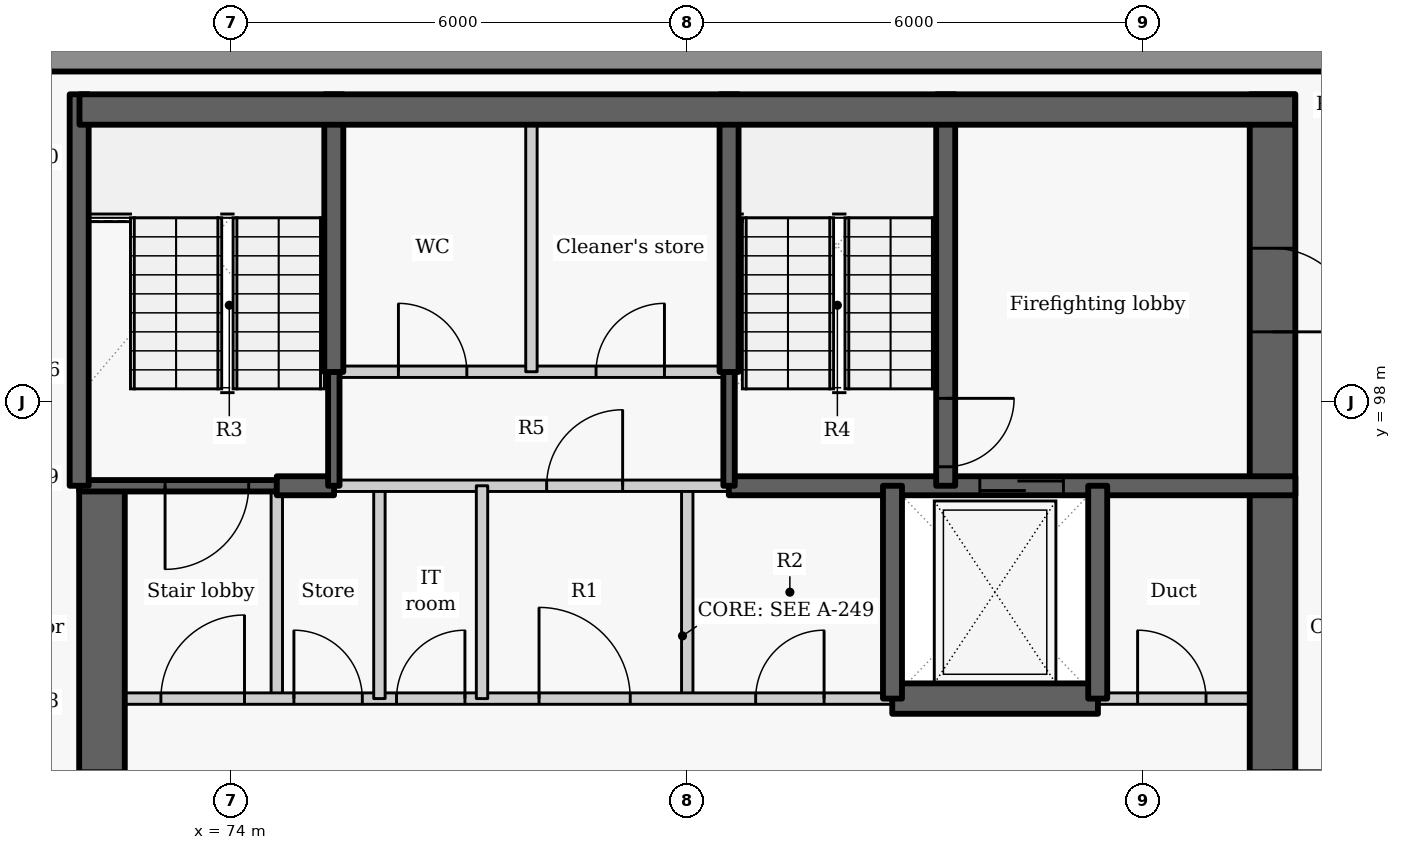
"""IFC4 building model, lengths in metres.
Left out: names, types, materials, properties, quantities, classifications, styles, units other than length and angle.
Written with IfcOpenShell. Run it as: python <this file> out.ifc"""

import sys

from ifc_helpers import new_model, si_unit, direction, frame, frame_2d, origin, place, context, subcontext, project, spatial, rectangle, extrude, element, fill, save


model = new_model("IFC4")
c1 = context("Model", 3, precision=1e-05, world=origin(), true_north=direction((0.0, 1.0)))
c2 = subcontext(c1, "Body", "Model", "MODEL_VIEW")
j1 = project(units=[si_unit("LENGTHUNIT", "METRE"), si_unit("PLANEANGLEUNIT", "RADIAN")], contexts=[c1])
p1 = place(None, origin())
s1 = spatial("IfcSite", under=j1, at=p1, CompositionType="ELEMENT")
p2 = place(p1, origin())
s2 = spatial("IfcBuilding", under=s1, at=p2, CompositionType="ELEMENT")
p3 = place(p2, frame((0.0, 0.0, 286.8)))
s3 = spatial("IfcBuildingStorey", under=s2, at=p3, CompositionType="ELEMENT", Elevation=286.8)
p4 = place(p3, frame((89.549, 102.5, 0.0), z_axis=(0.0, 0.0, 1.0), x_axis=(-1.0, 0.0, 0.0)))
e1 = element("IfcWall", 1, at=p4, inside=s3, PredefinedType="SOLIDWALL", context=c2, shape_type="SweptSolid", body=[
    extrude(rectangle(XDim=19.134, YDim=0.3, at=frame_2d((9.567, 0.0))), origin(), (0.0, 0.0, 1.0), 2.725),
])
p5 = place(p3, frame((74.6, 94.1, 0.0), z_axis=(0.0, 0.0, 1.0), x_axis=(0.0, 1.0, 0.0)))
e2 = element("IfcWall", 2, at=p5, inside=s3, PredefinedType="PARTITIONING", context=c2, shape_type="SweptSolid", body=[
    extrude(rectangle(XDim=2.8, YDim=0.15, at=frame_2d((1.4, 0.0))), origin(), (0.0, 0.0, 1.0), 3.325),
])
p6 = place(p3, frame((72.3, 87.8, -0.275), z_axis=(0.0, 0.0, 1.0), x_axis=(0.0, 1.0, 0.0)))
e3 = element("IfcWall", 3, at=p6, inside=s3, PredefinedType="SHEAR", context=c2, shape_type="SweptSolid", body=[
    extrude(rectangle(XDim=9.1, YDim=0.6, at=frame_2d((4.55, 0.0))), origin(), (0.0, 0.0, 1.0), 3.6),
])
p7 = place(p6, frame((3.85, 0.0, 0.275)))
e4 = element("IfcOpeningElement", 4, at=p7, cuts=e3, PredefinedType="OPENING", context=c2, shape_type="SweptSolid", body=[
    extrude(rectangle(XDim=1.5, YDim=2.1, at=frame_2d((0.75, 1.05))), frame((0.0, 0.31, 0.0), z_axis=(0.0, -1.0, 0.0), x_axis=(1.0, 0.0, 0.0)), (0.0, 0.0, 1.0), 0.62),
])
p8 = place(p3, frame((80.0, 94.1, 0.0), z_axis=(0.0, 0.0, 1.0), x_axis=(0.0, 1.0, 0.0)))
e5 = element("IfcWall", 5, at=p8, inside=s3, PredefinedType="PARTITIONING", context=c2, shape_type="SweptSolid", body=[
    extrude(rectangle(XDim=2.8, YDim=0.15, at=frame_2d((1.4, 0.0))), origin(), (0.0, 0.0, 1.0), 3.325),
])
p9 = place(p3, frame((72.0, 94.1, 0.0), z_axis=(0.0, 0.0, 1.0), x_axis=(1.0, 0.0, 0.0)))
e6 = element("IfcWall", 6, at=p9, inside=s3, PredefinedType="PARTITIONING", context=c2, shape_type="SweptSolid", body=[
    extrude(rectangle(XDim=10.703, YDim=0.15, at=frame_2d((5.352, 0.0))), origin(), (0.0, 0.0, 1.0), 3.325),
])
p10 = place(p9, frame((1.075, 0.0, 0.0)))
e7 = element("IfcOpeningElement", 7, at=p10, cuts=e6, PredefinedType="OPENING", context=c2, shape_type="SweptSolid", body=[
    extrude(rectangle(XDim=1.1, YDim=2.1, at=frame_2d((0.55, 1.05))), frame((0.0, 0.085, 0.0), z_axis=(0.0, -1.0, 0.0), x_axis=(1.0, 0.0, 0.0)), (0.0, 0.0, 1.0), 0.17),
])
p11 = place(p9, frame((2.825, 0.0, 0.0)))
e8 = element("IfcOpeningElement", 8, at=p11, cuts=e6, PredefinedType="OPENING", context=c2, shape_type="SweptSolid", body=[
    extrude(rectangle(XDim=0.9, YDim=2.1, at=frame_2d((0.45, 1.05))), frame((0.0, 0.085, 0.0), z_axis=(0.0, -1.0, 0.0), x_axis=(1.0, 0.0, 0.0)), (0.0, 0.0, 1.0), 0.17),
])
p12 = place(p9, frame((4.175, 0.0, 0.0)))
e9 = element("IfcOpeningElement", 9, at=p12, cuts=e6, PredefinedType="OPENING", context=c2, shape_type="SweptSolid", body=[
    extrude(rectangle(XDim=0.9, YDim=2.1, at=frame_2d((0.45, 1.05))), frame((0.0, 0.085, 0.0), z_axis=(0.0, -1.0, 0.0), x_axis=(1.0, 0.0, 0.0)), (0.0, 0.0, 1.0), 0.17),
])
p13 = place(p9, frame((6.05, 0.0, 0.0)))
e10 = element("IfcOpeningElement", 10, at=p13, cuts=e6, PredefinedType="OPENING", context=c2, shape_type="SweptSolid", body=[
    extrude(rectangle(XDim=1.2, YDim=2.1, at=frame_2d((0.6, 1.05))), frame((0.0, 0.085, 0.0), z_axis=(0.0, -1.0, 0.0), x_axis=(1.0, 0.0, 0.0)), (0.0, 0.0, 1.0), 0.17),
])
p14 = place(p9, frame((8.9, 0.0, 0.0)))
e11 = element("IfcOpeningElement", 11, at=p14, cuts=e6, PredefinedType="OPENING", context=c2, shape_type="SweptSolid", body=[
    extrude(rectangle(XDim=0.9, YDim=2.1, at=frame_2d((0.45, 1.05))), frame((0.0, 0.085, 0.0), z_axis=(0.0, -1.0, 0.0), x_axis=(1.0, 0.0, 0.0)), (0.0, 0.0, 1.0), 0.17),
])
p15 = place(p3, frame((85.397, 94.1, 0.0), z_axis=(0.0, 0.0, 1.0), x_axis=(1.0, 0.0, 0.0)))
e12 = element("IfcWall", 12, at=p15, inside=s3, PredefinedType="PARTITIONING", context=c2, shape_type="SweptSolid", body=[
    extrude(rectangle(XDim=2.603, YDim=0.15, at=frame_2d((1.302, 0.0))), origin(), (0.0, 0.0, 1.0), 3.325),
])
p16 = place(p15, frame((0.528, 0.0, 0.0)))
e13 = element("IfcOpeningElement", 13, at=p16, cuts=e12, PredefinedType="OPENING", context=c2, shape_type="SweptSolid", body=[
    extrude(rectangle(XDim=0.9, YDim=2.1, at=frame_2d((0.45, 1.05))), frame((0.0, 0.085, 0.0), z_axis=(0.0, -1.0, 0.0), x_axis=(1.0, 0.0, 0.0)), (0.0, 0.0, 1.0), 0.17),
])
p17 = place(p3, frame((82.697, 94.1, -0.275), z_axis=(0.0, 0.0, 1.0), x_axis=(1.0, 0.0, 0.0)))
e14 = element("IfcWall", 14, at=p17, inside=s3, PredefinedType="SHEAR", context=c2, shape_type="SweptSolid", body=[
    extrude(rectangle(XDim=2.706, YDim=0.4, at=frame_2d((1.353, 0.0))), origin(), (0.0, 0.0, 1.0), 3.6),
])
p18 = place(p3, frame((87.7, 102.05, -0.275), z_axis=(0.0, 0.0, 1.0), x_axis=(0.0, -1.0, 0.0)))
e15 = element("IfcWall", 15, at=p18, inside=s3, PredefinedType="SHEAR", context=c2, shape_type="SweptSolid", body=[
    extrude(rectangle(XDim=11.35, YDim=0.6, at=frame_2d((5.675, 0.0))), origin(), (0.0, 0.0, 1.0), 3.6),
])
p19 = place(p18, frame((8.9, 0.0, 0.275)))
e16 = element("IfcOpeningElement", 16, at=p19, cuts=e15, PredefinedType="OPENING", context=c2, shape_type="SweptSolid", body=[
    extrude(rectangle(XDim=1.5, YDim=2.1, at=frame_2d((0.75, 1.05))), frame((0.0, 0.31, 0.0), z_axis=(0.0, -1.0, 0.0), x_axis=(1.0, 0.0, 0.0)), (0.0, 0.0, 1.0), 0.62),
])
p20 = place(p18, frame((2.025, 0.0, 0.275)))
e17 = element("IfcOpeningElement", 17, at=p20, cuts=e15, PredefinedType="OPENING", context=c2, shape_type="SweptSolid", body=[
    extrude(rectangle(XDim=1.1, YDim=2.1, at=frame_2d((0.55, 1.05))), frame((0.0, 0.31, 0.0), z_axis=(0.0, -1.0, 0.0), x_axis=(1.0, 0.0, 0.0)), (0.0, 0.0, 1.0), 0.62),
])
p21 = place(p3, frame((74.6, 96.9, -0.275), z_axis=(0.0, 0.0, 1.0), x_axis=(-1.0, 0.0, 0.0)))
e18 = element("IfcWall", 18, at=p21, inside=s3, PredefinedType="SHEAR", context=c2, shape_type="SweptSolid", body=[
    extrude(rectangle(XDim=2.6, YDim=0.15, at=frame_2d((1.3, 0.0))), origin(), (0.0, 0.0, 1.0), 3.6),
])
p22 = place(p21, frame((0.37, 0.0, 0.275)))
e19 = element("IfcOpeningElement", 19, at=p22, cuts=e18, PredefinedType="OPENING", context=c2, shape_type="SweptSolid", body=[
    extrude(rectangle(XDim=1.1, YDim=2.1, at=frame_2d((0.55, 1.05))), frame((0.0, 0.085, 0.0), z_axis=(0.0, -1.0, 0.0), x_axis=(1.0, 0.0, 0.0)), (0.0, 0.0, 1.0), 0.17),
])
p23 = place(p3, frame((75.95, 94.1, 0.0), z_axis=(0.0, 0.0, 1.0), x_axis=(0.0, 1.0, 0.0)))
e20 = element("IfcWall", 20, at=p23, inside=s3, PredefinedType="PARTITIONING", context=c2, shape_type="SweptSolid", body=[
    extrude(rectangle(XDim=2.8, YDim=0.15, at=frame_2d((1.4, 0.0))), origin(), (0.0, 0.0, 1.0), 3.325),
])
p24 = place(p3, frame((74.6, 96.9, -0.275), z_axis=(0.0, 0.0, 1.0), x_axis=(1.0, 0.0, 0.0)))
e21 = element("IfcWall", 21, at=p24, inside=s3, PredefinedType="SHEAR", context=c2, shape_type="SweptSolid", body=[
    extrude(rectangle(XDim=0.753, YDim=0.25, at=frame_2d((0.376, 0.0))), origin(), (0.0, 0.0, 1.0), 3.6),
])
p25 = place(p3, frame((80.547, 96.9, -0.275), z_axis=(0.0, 0.0, 1.0), x_axis=(1.0, 0.0, 0.0)))
e22 = element("IfcWall", 22, at=p25, inside=s3, PredefinedType="SHEAR", context=c2, shape_type="SweptSolid", body=[
    extrude(rectangle(XDim=7.453, YDim=0.25, at=frame_2d((3.727, 0.0))), origin(), (0.0, 0.0, 1.0), 3.6),
])
p26 = place(p25, frame((3.302, 0.0, 0.275)))
e23 = element("IfcOpeningElement", 23, at=p26, cuts=e22, PredefinedType="OPENING", context=c2, shape_type="SweptSolid", body=[
    extrude(rectangle(XDim=1.1, YDim=2.1, at=frame_2d((0.55, 1.05))), frame((0.0, 0.135, 0.0), z_axis=(0.0, -1.0, 0.0), x_axis=(1.0, 0.0, 0.0)), (0.0, 0.0, 1.0), 0.27),
])
p27 = place(p3, frame((75.347, 96.9, 0.0), z_axis=(0.0, 0.0, 1.0), x_axis=(1.0, 0.0, 0.0)))
e24 = element("IfcWall", 24, at=p27, inside=s3, PredefinedType="PARTITIONING", context=c2, shape_type="SweptSolid", body=[
    extrude(rectangle(XDim=5.206, YDim=0.15, at=frame_2d((2.603, 0.0))), origin(), (0.0, 0.0, 1.0), 3.325),
])
p28 = place(p27, frame((2.803, 0.0, 0.0)))
e25 = element("IfcOpeningElement", 25, at=p28, cuts=e24, PredefinedType="OPENING", context=c2, shape_type="SweptSolid", body=[
    extrude(rectangle(XDim=1.0, YDim=2.1, at=frame_2d((0.5, 1.05))), frame((0.0, 0.085, 0.0), z_axis=(0.0, -1.0, 0.0), x_axis=(1.0, 0.0, 0.0)), (0.0, 0.0, 1.0), 0.17),
])
p29 = place(p3, frame((77.3, 94.1, 0.0), z_axis=(0.0, 0.0, 1.0), x_axis=(0.0, 1.0, 0.0)))
e26 = element("IfcWall", 26, at=p29, inside=s3, PredefinedType="PARTITIONING", context=c2, shape_type="SweptSolid", body=[
    extrude(rectangle(XDim=2.8, YDim=0.15, at=frame_2d((1.4, 0.0))), origin(), (0.0, 0.0, 1.0), 3.325),
])
for number, where, z_axis, x_axis in (
    (27, (82.7, 94.1, -0.275), (0.0, 0.0, 1.0), (0.0, 1.0, 0.0)),
    (28, (85.4, 94.1, -0.275), (0.0, 0.0, 1.0), (0.0, 1.0, 0.0)),
):
    element("IfcWall", number, at=place(p3, frame(where, z_axis=z_axis, x_axis=x_axis)), inside=s3, PredefinedType="SHEAR", context=c2, shape_type="SweptSolid", body=[
        extrude(rectangle(XDim=2.8, YDim=0.25, at=frame_2d((1.4, 0.0))), origin(), (0.0, 0.0, 1.0), 3.6),
    ])
p30 = place(p3, frame((75.35, 96.9, -0.275), z_axis=(0.0, 0.0, 1.0), x_axis=(0.0, 1.0, 0.0)))
e29 = element("IfcWall", 29, at=p30, inside=s3, PredefinedType="SHEAR", context=c2, shape_type="SweptSolid", body=[
    extrude(rectangle(XDim=1.503, YDim=0.15, at=frame_2d((0.751, 0.0))), origin(), (0.0, 0.0, 1.0), 3.6),
])
p31 = place(p3, frame((75.35, 98.397, -0.275), z_axis=(0.0, 0.0, 1.0), x_axis=(0.0, 1.0, 0.0)))
e30 = element("IfcWall", 30, at=p31, inside=s3, PredefinedType="SHEAR", context=c2, shape_type="SweptSolid", body=[
    extrude(rectangle(XDim=3.653, YDim=0.25, at=frame_2d((1.827, 0.0))), origin(), (0.0, 0.0, 1.0), 3.6),
])
p32 = place(p3, frame((72.0, 96.9, -0.275), z_axis=(0.0, 0.0, 1.0), x_axis=(0.0, 1.0, 0.0)))
e31 = element("IfcWall", 31, at=p32, inside=s3, PredefinedType="SHEAR", context=c2, shape_type="SweptSolid", body=[
    extrude(rectangle(XDim=5.15, YDim=0.25, at=frame_2d((2.575, 0.0))), origin(), (0.0, 0.0, 1.0), 3.6),
])
p33 = place(p3, frame((83.4, 102.05, -0.275), z_axis=(0.0, 0.0, 1.0), x_axis=(0.0, -1.0, 0.0)))
e32 = element("IfcWall", 32, at=p33, inside=s3, PredefinedType="SHEAR", context=c2, shape_type="SweptSolid", body=[
    extrude(rectangle(XDim=5.15, YDim=0.25, at=frame_2d((2.575, 0.0))), origin(), (0.0, 0.0, 1.0), 3.6),
])
p34 = place(p33, frame((4.0, 0.0, 0.275)))
e33 = element("IfcOpeningElement", 33, at=p34, cuts=e32, PredefinedType="OPENING", context=c2, shape_type="SweptSolid", body=[
    extrude(rectangle(XDim=0.9, YDim=2.1, at=frame_2d((0.45, 1.05))), frame((0.0, 0.135, 0.0), z_axis=(0.0, -1.0, 0.0), x_axis=(1.0, 0.0, 0.0)), (0.0, 0.0, 1.0), 0.27),
])
p35 = place(p3, frame((80.55, 96.9, -0.275), z_axis=(0.0, 0.0, 1.0), x_axis=(0.0, 1.0, 0.0)))
e34 = element("IfcWall", 34, at=p35, inside=s3, PredefinedType="SHEAR", context=c2, shape_type="SweptSolid", body=[
    extrude(rectangle(XDim=1.503, YDim=0.15, at=frame_2d((0.751, 0.0))), origin(), (0.0, 0.0, 1.0), 3.6),
])
p36 = place(p3, frame((80.55, 98.397, -0.275), z_axis=(0.0, 0.0, 1.0), x_axis=(0.0, 1.0, 0.0)))
e35 = element("IfcWall", 35, at=p36, inside=s3, PredefinedType="SHEAR", context=c2, shape_type="SweptSolid", body=[
    extrude(rectangle(XDim=3.653, YDim=0.25, at=frame_2d((1.827, 0.0))), origin(), (0.0, 0.0, 1.0), 3.6),
])
p37 = place(p3, frame((75.35, 98.4, 0.0), z_axis=(0.0, 0.0, 1.0), x_axis=(1.0, 0.0, 0.0)))
e36 = element("IfcWall", 36, at=p37, inside=s3, PredefinedType="PARTITIONING", context=c2, shape_type="SweptSolid", body=[
    extrude(rectangle(XDim=5.2, YDim=0.15, at=frame_2d((2.6, 0.0))), origin(), (0.0, 0.0, 1.0), 3.325),
])
p38 = place(p37, frame((0.85, 0.0, 0.0)))
e37 = element("IfcOpeningElement", 37, at=p38, cuts=e36, PredefinedType="OPENING", context=c2, shape_type="SweptSolid", body=[
    extrude(rectangle(XDim=0.9, YDim=2.1, at=frame_2d((0.45, 1.05))), frame((0.0, 0.085, 0.0), z_axis=(0.0, -1.0, 0.0), x_axis=(1.0, 0.0, 0.0)), (0.0, 0.0, 1.0), 0.17),
])
p39 = place(p37, frame((3.45, 0.0, 0.0)))
e38 = element("IfcOpeningElement", 38, at=p39, cuts=e36, PredefinedType="OPENING", context=c2, shape_type="SweptSolid", body=[
    extrude(rectangle(XDim=0.9, YDim=2.1, at=frame_2d((0.45, 1.05))), frame((0.0, 0.085, 0.0), z_axis=(0.0, -1.0, 0.0), x_axis=(1.0, 0.0, 0.0)), (0.0, 0.0, 1.0), 0.17),
])
p40 = place(p3, frame((77.95, 98.4, 0.0), z_axis=(0.0, 0.0, 1.0), x_axis=(0.0, 1.0, 0.0)))
e39 = element("IfcWall", 39, at=p40, inside=s3, PredefinedType="PARTITIONING", context=c2, shape_type="SweptSolid", body=[
    extrude(rectangle(XDim=3.65, YDim=0.15, at=frame_2d((1.825, 0.0))), origin(), (0.0, 0.0, 1.0), 3.325),
])
p41 = place(p3, frame((72.004, 101.85, -0.275), z_axis=(0.0, 0.0, 1.0), x_axis=(1.0, 0.0, 0.0)))
e40 = element("IfcWall", 40, at=p41, inside=s3, PredefinedType="SHEAR", context=c2, shape_type="SweptSolid", body=[
    extrude(rectangle(XDim=15.992, YDim=0.4, at=frame_2d((7.996, 0.0))), origin(), (0.0, 0.0, 1.0), 3.6),
])
p42 = place(p10, origin())
e41 = element("IfcDoor", 41, at=p42, inside=s3, OperationType="SINGLE_SWING_RIGHT", PredefinedType="DOOR", context=c2, shape_type="SweptSolid", body=[
    extrude(rectangle(XDim=1.1, YDim=2.1, at=frame_2d((0.55, 1.05))), frame((0.0, 0.025, 0.0), z_axis=(0.0, -1.0, 0.0), x_axis=(1.0, 0.0, 0.0)), (0.0, 0.0, 1.0), 0.05),
])
fill(e7, e41)
p43 = place(p11, origin())
e42 = element("IfcDoor", 42, at=p43, inside=s3, OperationType="SINGLE_SWING_LEFT", PredefinedType="DOOR", context=c2, shape_type="SweptSolid", body=[
    extrude(rectangle(XDim=0.9, YDim=2.1, at=frame_2d((0.45, 1.05))), frame((0.0, 0.025, 0.0), z_axis=(0.0, -1.0, 0.0), x_axis=(1.0, 0.0, 0.0)), (0.0, 0.0, 1.0), 0.05),
])
fill(e8, e42)
p44 = place(p12, origin())
e43 = element("IfcDoor", 43, at=p44, inside=s3, OperationType="SINGLE_SWING_RIGHT", PredefinedType="DOOR", context=c2, shape_type="SweptSolid", body=[
    extrude(rectangle(XDim=0.9, YDim=2.1, at=frame_2d((0.45, 1.05))), frame((0.0, 0.025, 0.0), z_axis=(0.0, -1.0, 0.0), x_axis=(1.0, 0.0, 0.0)), (0.0, 0.0, 1.0), 0.05),
])
fill(e9, e43)
p45 = place(p13, origin())
e44 = element("IfcDoor", 44, at=p45, inside=s3, OperationType="DOUBLE_DOOR_SINGLE_SWING", PredefinedType="DOOR", context=c2, shape_type="SweptSolid", body=[
    extrude(rectangle(XDim=1.2, YDim=2.1, at=frame_2d((0.6, 1.05))), frame((0.0, 0.025, 0.0), z_axis=(0.0, -1.0, 0.0), x_axis=(1.0, 0.0, 0.0)), (0.0, 0.0, 1.0), 0.05),
])
fill(e10, e44)
p46 = place(p14, origin())
e45 = element("IfcDoor", 45, at=p46, inside=s3, OperationType="SINGLE_SWING_RIGHT", PredefinedType="DOOR", context=c2, shape_type="SweptSolid", body=[
    extrude(rectangle(XDim=0.9, YDim=2.1, at=frame_2d((0.45, 1.05))), frame((0.0, 0.025, 0.0), z_axis=(0.0, -1.0, 0.0), x_axis=(1.0, 0.0, 0.0)), (0.0, 0.0, 1.0), 0.05),
])
fill(e11, e45)
p47 = place(p26, origin())
e46 = element("IfcDoor", 46, at=p47, inside=s3, OperationType="SLIDING_TO_LEFT", PredefinedType="DOOR", context=c2, shape_type="SweptSolid", body=[
    extrude(rectangle(XDim=1.1, YDim=2.1, at=frame_2d((0.55, 1.05))), frame((0.0, 0.025, 0.0), z_axis=(0.0, -1.0, 0.0), x_axis=(1.0, 0.0, 0.0)), (0.0, 0.0, 1.0), 0.05),
])
fill(e23, e46)
p48 = place(p16, origin())
e47 = element("IfcDoor", 47, at=p48, inside=s3, OperationType="SINGLE_SWING_LEFT", PredefinedType="DOOR", context=c2, shape_type="SweptSolid", body=[
    extrude(rectangle(XDim=0.9, YDim=2.1, at=frame_2d((0.45, 1.05))), frame((0.0, 0.025, 0.0), z_axis=(0.0, -1.0, 0.0), x_axis=(1.0, 0.0, 0.0)), (0.0, 0.0, 1.0), 0.05),
])
fill(e13, e47)
p49 = place(p28, origin())
e48 = element("IfcDoor", 48, at=p49, inside=s3, OperationType="SINGLE_SWING_RIGHT", PredefinedType="DOOR", context=c2, shape_type="SweptSolid", body=[
    extrude(rectangle(XDim=1.0, YDim=2.1, at=frame_2d((0.5, 1.05))), frame((0.0, 0.025, 0.0), z_axis=(0.0, -1.0, 0.0), x_axis=(1.0, 0.0, 0.0)), (0.0, 0.0, 1.0), 0.05),
])
fill(e25, e48)
p50 = place(p38, origin())
e49 = element("IfcDoor", 49, at=p50, inside=s3, OperationType="SINGLE_SWING_LEFT", PredefinedType="DOOR", context=c2, shape_type="SweptSolid", body=[
    extrude(rectangle(XDim=0.9, YDim=2.1, at=frame_2d((0.45, 1.05))), frame((0.0, 0.025, 0.0), z_axis=(0.0, -1.0, 0.0), x_axis=(1.0, 0.0, 0.0)), (0.0, 0.0, 1.0), 0.05),
])
fill(e37, e49)
p51 = place(p39, origin())
e50 = element("IfcDoor", 50, at=p51, inside=s3, OperationType="SINGLE_SWING_RIGHT", PredefinedType="DOOR", context=c2, shape_type="SweptSolid", body=[
    extrude(rectangle(XDim=0.9, YDim=2.1, at=frame_2d((0.45, 1.05))), frame((0.0, 0.025, 0.0), z_axis=(0.0, -1.0, 0.0), x_axis=(1.0, 0.0, 0.0)), (0.0, 0.0, 1.0), 0.05),
])
fill(e38, e50)
p52 = place(p22, origin())
e51 = element("IfcDoor", 51, at=p52, inside=s3, OperationType="SINGLE_SWING_RIGHT", PredefinedType="DOOR", context=c2, shape_type="SweptSolid", body=[
    extrude(rectangle(XDim=1.1, YDim=2.1, at=frame_2d((0.55, 1.05))), frame((0.0, 0.025, 0.0), z_axis=(0.0, -1.0, 0.0), x_axis=(1.0, 0.0, 0.0)), (0.0, 0.0, 1.0), 0.05),
])
fill(e19, e51)
p53 = place(p34, origin())
e52 = element("IfcDoor", 52, at=p53, inside=s3, OperationType="SINGLE_SWING_LEFT", PredefinedType="DOOR", context=c2, shape_type="SweptSolid", body=[
    extrude(rectangle(XDim=0.9, YDim=2.1, at=frame_2d((0.45, 1.05))), frame((0.0, 0.025, 0.0), z_axis=(0.0, -1.0, 0.0), x_axis=(1.0, 0.0, 0.0)), (0.0, 0.0, 1.0), 0.05),
])
fill(e33, e52)
p54 = place(p19, origin())
e53 = element("IfcDoor", 53, at=p54, inside=s3, OperationType="DOUBLE_DOOR_SINGLE_SWING", PredefinedType="DOOR", context=c2, shape_type="SweptSolid", body=[
    extrude(rectangle(XDim=1.5, YDim=2.1, at=frame_2d((0.75, 1.05))), frame((0.0, 0.025, 0.0), z_axis=(0.0, -1.0, 0.0), x_axis=(1.0, 0.0, 0.0)), (0.0, 0.0, 1.0), 0.05),
])
fill(e16, e53)
p55 = place(p7, origin())
e54 = element("IfcDoor", 54, at=p55, inside=s3, OperationType="DOUBLE_DOOR_SINGLE_SWING", PredefinedType="DOOR", context=c2, shape_type="SweptSolid", body=[
    extrude(rectangle(XDim=1.5, YDim=2.1, at=frame_2d((0.75, 1.05))), frame((0.0, 0.025, 0.0), z_axis=(0.0, -1.0, 0.0), x_axis=(1.0, 0.0, 0.0)), (0.0, 0.0, 1.0), 0.05),
])
fill(e4, e54)
p56 = place(p20, origin())
e55 = element("IfcDoor", 55, at=p56, inside=s3, OperationType="SINGLE_SWING_RIGHT", PredefinedType="DOOR", context=c2, shape_type="SweptSolid", body=[
    extrude(rectangle(XDim=1.1, YDim=2.1, at=frame_2d((0.55, 1.05))), frame((0.0, 0.025, 0.0), z_axis=(0.0, -1.0, 0.0), x_axis=(1.0, 0.0, 0.0)), (0.0, 0.0, 1.0), 0.05),
])
fill(e17, e55)
save(model, sys.argv[1])
